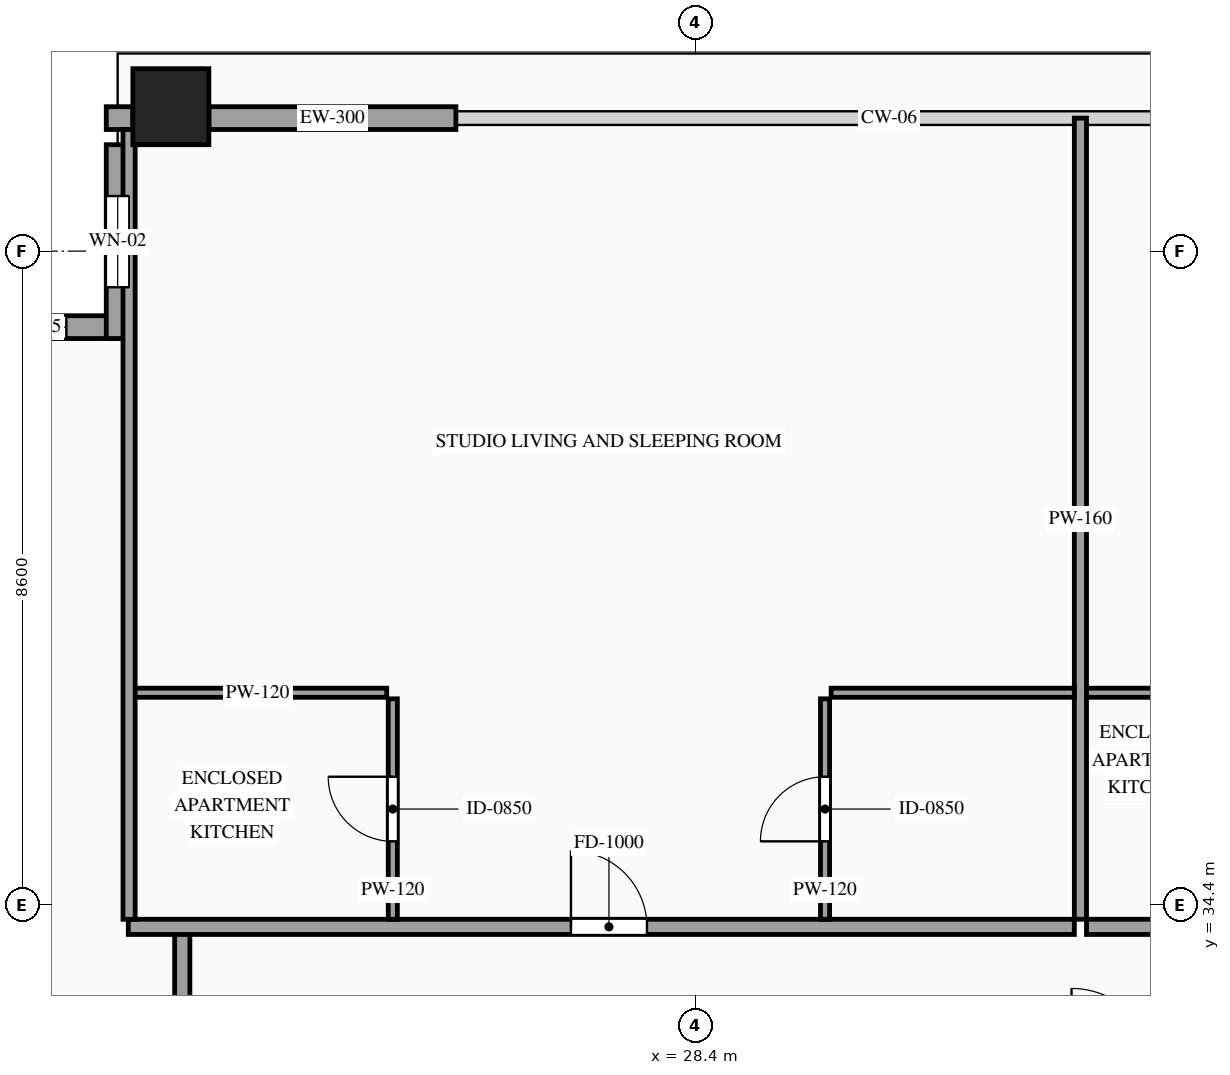
"""IFC4 building model, lengths in metres.
Left out: names, types, materials, properties, quantities, classifications, styles, units other than length and angle.
Written with IfcOpenShell. Run it as: python <this file> out.ifc"""

import sys

from ifc_helpers import new_model, si_unit, direction, frame, frame_2d, origin, origin_2d, place, context, subcontext, project, spatial, rectangle, hollow_rectangle, extrude, source, transform, mapped, element, fill, save


model = new_model("IFC4")
c1 = context("Model", 3, precision=1e-05, world=origin(), true_north=direction((0.0, 1.0)))
c2 = subcontext(c1, "Body", "Model", "MODEL_VIEW")
j1 = project(units=[si_unit("LENGTHUNIT", "METRE"), si_unit("PLANEANGLEUNIT", "RADIAN")], contexts=[c1])
p1 = place(None, origin())
s1 = spatial("IfcSite", under=j1, at=p1, CompositionType="ELEMENT")
p2 = place(p1, origin())
s2 = spatial("IfcBuilding", under=s1, at=p2, CompositionType="ELEMENT")
p3 = place(p2, frame((0.0, 0.0, 339.2)))
s3 = spatial("IfcBuildingStorey", under=s2, at=p3, CompositionType="ELEMENT", Elevation=339.2)
m1 = source(origin(), c2, "Body", "SweptSolid", [
    extrude(hollow_rectangle(XDim=1.0, YDim=1.0, WallThickness=0.048, at=origin_2d()), origin(), (0.0, 0.0, 1.0), 4.0),
])
p4 = place(p3, frame((21.5, 44.9, 0.0), z_axis=(0.0, 0.0, 1.0), x_axis=(1.0, 0.0, 0.0)))
e1 = element("IfcColumn", 1, at=p4, inside=s3, PredefinedType="COLUMN", context=c2, shape_type="MappedRepresentation", body=[
    mapped(m1, transform((0.0, 0.0, 0.0), scale=1.0)),
])
p5 = place(p3, frame((20.95, 42.0, 0.0), z_axis=(0.0, 0.0, 1.0), x_axis=(-1.0, 0.0, 0.0)))
e2 = element("IfcWall", 2, at=p5, inside=s3, PredefinedType="SOLIDWALL", context=c2, shape_type="SweptSolid", body=[
    extrude(rectangle(XDim=2.55, YDim=0.3, at=frame_2d((1.275, 0.0))), origin(), (0.0, 0.0, 1.0), 3.76),
])
p6 = place(p5, frame((0.825, 0.0, 0.85)))
e3 = element("IfcOpeningElement", 3, at=p6, cuts=e2, PredefinedType="OPENING", context=c2, shape_type="SweptSolid", body=[
    extrude(rectangle(XDim=0.9, YDim=1.5, at=frame_2d((0.45, 0.75))), frame((0.0, 0.165, 0.0), z_axis=(0.0, -1.0, 0.0), x_axis=(1.0, 0.0, 0.0)), (0.0, 0.0, 1.0), 0.33),
])
p7 = place(p3, frame((20.8, 44.4, 0.0), z_axis=(0.0, 0.0, 1.0), x_axis=(0.0, -1.0, 0.0)))
e4 = element("IfcWall", 4, at=p7, inside=s3, PredefinedType="SOLIDWALL", context=c2, shape_type="SweptSolid", body=[
    extrude(rectangle(XDim=2.55, YDim=0.3, at=frame_2d((1.275, 0.0))), origin(), (0.0, 0.0, 1.0), 3.76),
])
p8 = place(p7, frame((0.675, 0.0, 0.85)))
e5 = element("IfcOpeningElement", 5, at=p8, cuts=e4, PredefinedType="OPENING", context=c2, shape_type="SweptSolid", body=[
    extrude(rectangle(XDim=1.2, YDim=2.1, at=frame_2d((0.6, 1.05))), frame((0.0, 0.165, 0.0), z_axis=(0.0, -1.0, 0.0), x_axis=(1.0, 0.0, 0.0)), (0.0, 0.0, 1.0), 0.33),
])
m2 = source(origin(), c2, "Body", "SweptSolid", [
    extrude(rectangle(XDim=0.35, YDim=0.3, at=frame_2d((0.175, 0.0))), origin(), (0.0, 0.0, 1.0), 3.76),
])
p9 = place(p3, frame((20.65, 44.75, 0.0), z_axis=(0.0, 0.0, 1.0), x_axis=(1.0, 0.0, 0.0)))
e6 = element("IfcWall", 6, at=p9, inside=s3, PredefinedType="SOLIDWALL", context=c2, shape_type="MappedRepresentation", body=[
    mapped(m2, transform((0.0, 0.0, 0.0), scale=1.0)),
])
m3 = source(origin(), c2, "Body", "SweptSolid", [
    extrude(rectangle(XDim=3.25, YDim=0.3, at=frame_2d((1.625, 0.0))), origin(), (0.0, 0.0, 1.0), 3.365),
])
p10 = place(p3, frame((22.0, 44.75, 0.0), z_axis=(0.0, 0.0, 1.0), x_axis=(1.0, 0.0, 0.0)))
e7 = element("IfcWall", 7, at=p10, inside=s3, PredefinedType="SOLIDWALL", context=c2, shape_type="MappedRepresentation", body=[
    mapped(m3, transform((0.0, 0.0, 0.0), scale=1.0)),
])
m4 = source(origin(), c2, "Body", "SweptSolid", [
    extrude(rectangle(XDim=1.7, YDim=0.2, at=frame_2d((0.85, 0.0))), origin(), (0.0, 0.0, 1.0), 3.76),
])
p11 = place(p3, frame((21.65, 32.35, 0.0), z_axis=(0.0, 0.0, 1.0), x_axis=(0.0, 1.0, 0.0)))
e8 = element("IfcWall", 8, at=p11, inside=s3, PredefinedType="PARTITIONING", context=c2, shape_type="MappedRepresentation", body=[
    mapped(m4, transform((0.0, 0.0, 0.0), scale=1.0)),
])
p12 = place(p3, frame((20.94, 34.11, 0.0), z_axis=(0.0, 0.0, 1.0), x_axis=(1.0, 0.0, 0.0)))
e9 = element("IfcWall", 9, at=p12, inside=s3, PredefinedType="PARTITIONING", context=c2, shape_type="SweptSolid", body=[
    extrude(rectangle(XDim=12.447, YDim=0.2, at=frame_2d((6.224, 0.0))), origin(), (0.0, 0.0, 1.0), 3.76),
])
p13 = place(p12, frame((5.824, 0.0, 0.0)))
e10 = element("IfcOpeningElement", 10, at=p13, cuts=e9, PredefinedType="OPENING", context=c2, shape_type="SweptSolid", body=[
    extrude(rectangle(XDim=1.0, YDim=2.2, at=frame_2d((0.5, 1.1))), frame((0.0, 0.115, 0.0), z_axis=(0.0, -1.0, 0.0), x_axis=(1.0, 0.0, 0.0)), (0.0, 0.0, 1.0), 0.23),
])
m5 = source(origin(), c2, "Body", "SweptSolid", [
    extrude(rectangle(XDim=10.54, YDim=0.16, at=frame_2d((5.27, 0.0))), origin(), (0.0, 0.0, 1.0), 3.76),
])
p14 = place(p3, frame((33.467, 34.21, 0.0), z_axis=(0.0, 0.0, 1.0), x_axis=(0.0, 1.0, 0.0)))
e11 = element("IfcWall", 11, at=p14, inside=s3, PredefinedType="PARTITIONING", context=c2, shape_type="MappedRepresentation", body=[
    mapped(m5, transform((0.0, 0.0, 0.0), scale=1.0)),
])
m6 = source(origin(), c2, "Body", "SweptSolid", [
    extrude(rectangle(XDim=3.4, YDim=0.12, at=frame_2d((1.7, 0.0))), origin(), (0.0, 0.0, 1.0), 3.76),
])
p15 = place(p3, frame((20.94, 37.19, 0.0), z_axis=(0.0, 0.0, 1.0), x_axis=(1.0, 0.0, 0.0)))
e12 = element("IfcWall", 12, at=p15, inside=s3, PredefinedType="PARTITIONING", context=c2, shape_type="MappedRepresentation", body=[
    mapped(m6, transform((0.0, 0.0, 0.0), scale=1.0)),
])
p16 = place(p3, frame((24.42, 34.21, 0.0), z_axis=(0.0, 0.0, 1.0), x_axis=(0.0, 1.0, 0.0)))
e13 = element("IfcWall", 13, at=p16, inside=s3, PredefinedType="PARTITIONING", context=c2, shape_type="SweptSolid", body=[
    extrude(rectangle(XDim=2.9, YDim=0.12, at=frame_2d((1.45, 0.0))), origin(), (0.0, 0.0, 1.0), 3.76),
])
p17 = place(p16, frame((1.025, 0.0, 0.0)))
e14 = element("IfcOpeningElement", 14, at=p17, cuts=e13, PredefinedType="OPENING", context=c2, shape_type="SweptSolid", body=[
    extrude(rectangle(XDim=0.85, YDim=2.1, at=frame_2d((0.425, 1.05))), frame((0.0, 0.075, 0.0), z_axis=(0.0, -1.0, 0.0), x_axis=(1.0, 0.0, 0.0)), (0.0, 0.0, 1.0), 0.15),
])
m7 = source(origin(), c2, "Body", "SweptSolid", [
    extrude(rectangle(XDim=3.2, YDim=0.12, at=frame_2d((1.6, 0.0))), origin(), (0.0, 0.0, 1.0), 3.76),
])
p18 = place(p3, frame((30.187, 37.19, 0.0), z_axis=(0.0, 0.0, 1.0), x_axis=(1.0, 0.0, 0.0)))
e15 = element("IfcWall", 15, at=p18, inside=s3, PredefinedType="PARTITIONING", context=c2, shape_type="MappedRepresentation", body=[
    mapped(m7, transform((0.0, 0.0, 0.0), scale=1.0)),
])
p19 = place(p3, frame((30.107, 34.21, 0.0), z_axis=(0.0, 0.0, 1.0), x_axis=(0.0, 1.0, 0.0)))
e16 = element("IfcWall", 16, at=p19, inside=s3, PredefinedType="PARTITIONING", context=c2, shape_type="SweptSolid", body=[
    extrude(rectangle(XDim=2.9, YDim=0.12, at=frame_2d((1.45, 0.0))), origin(), (0.0, 0.0, 1.0), 3.76),
])
p20 = place(p19, frame((1.025, 0.0, 0.0)))
e17 = element("IfcOpeningElement", 17, at=p20, cuts=e16, PredefinedType="OPENING", context=c2, shape_type="SweptSolid", body=[
    extrude(rectangle(XDim=0.85, YDim=2.1, at=frame_2d((0.425, 1.05))), frame((0.0, 0.075, 0.0), z_axis=(0.0, -1.0, 0.0), x_axis=(1.0, 0.0, 0.0)), (0.0, 0.0, 1.0), 0.15),
])
p21 = place(p3, frame((33.547, 34.11, 0.0), z_axis=(0.0, 0.0, 1.0), x_axis=(1.0, 0.0, 0.0)))
e18 = element("IfcWall", 18, at=p21, inside=s3, PredefinedType="PARTITIONING", context=c2, shape_type="SweptSolid", body=[
    extrude(rectangle(XDim=6.906, YDim=0.2, at=frame_2d((3.453, 0.0))), origin(), (0.0, 0.0, 1.0), 3.76),
])
p22 = place(p21, frame((2.953, 0.0, 0.0)))
e19 = element("IfcOpeningElement", 19, at=p22, cuts=e18, PredefinedType="OPENING", context=c2, shape_type="SweptSolid", body=[
    extrude(rectangle(XDim=1.0, YDim=2.2, at=frame_2d((0.5, 1.1))), frame((0.0, 0.115, 0.0), z_axis=(0.0, -1.0, 0.0), x_axis=(1.0, 0.0, 0.0)), (0.0, 0.0, 1.0), 0.23),
])
m8 = source(origin(), c2, "Body", "SweptSolid", [
    extrude(rectangle(XDim=2.211, YDim=0.12, at=frame_2d((1.105, 0.0))), origin(), (0.0, 0.0, 1.0), 3.76),
])
p23 = place(p3, frame((33.547, 37.19, 0.0), z_axis=(0.0, 0.0, 1.0), x_axis=(1.0, 0.0, 0.0)))
e20 = element("IfcWall", 20, at=p23, inside=s3, PredefinedType="PARTITIONING", context=c2, shape_type="MappedRepresentation", body=[
    mapped(m8, transform((0.0, 0.0, 0.0), scale=1.0)),
])
m9 = source(origin(), c2, "Body", "SweptSolid", [
    extrude(rectangle(XDim=10.39, YDim=0.16, at=frame_2d((5.195, 0.0))), origin(), (0.0, 0.0, 1.0), 3.76),
])
p24 = place(p3, frame((20.95, 34.21, 0.0), z_axis=(0.0, 0.0, 1.0), x_axis=(0.0, 1.0, 0.0)))
e21 = element("IfcWall", 21, at=p24, inside=s3, PredefinedType="PARTITIONING", context=c2, shape_type="MappedRepresentation", body=[
    mapped(m9, transform((0.0, 0.0, 0.0), scale=1.0)),
])
m10 = source(origin(), c2, "Body", "SweptSolid", [
    extrude(rectangle(XDim=0.9, YDim=1.5, at=frame_2d((0.45, 0.75))), frame((0.0, 0.03, 0.0), z_axis=(0.0, -1.0, 0.0), x_axis=(1.0, 0.0, 0.0)), (0.0, 0.0, 1.0), 0.06),
])
p25 = place(p6, origin())
e22 = element("IfcWindow", 22, at=p25, inside=s3, PartitioningType="SINGLE_PANEL", PredefinedType="WINDOW", context=c2, shape_type="MappedRepresentation", body=[
    mapped(m10, transform((0.0, 0.0, 0.0), scale=1.0)),
])
fill(e3, e22)
m11 = source(origin(), c2, "Body", "SweptSolid", [
    extrude(rectangle(XDim=1.2, YDim=2.1, at=frame_2d((0.6, 1.05))), frame((0.0, 0.03, 0.0), z_axis=(0.0, -1.0, 0.0), x_axis=(1.0, 0.0, 0.0)), (0.0, 0.0, 1.0), 0.06),
])
p26 = place(p8, origin())
e23 = element("IfcWindow", 23, at=p26, inside=s3, PartitioningType="SINGLE_PANEL", PredefinedType="WINDOW", context=c2, shape_type="MappedRepresentation", body=[
    mapped(m11, transform((0.0, 0.0, 0.0), scale=1.0)),
])
fill(e5, e23)
m12 = source(origin(), c2, "Body", "SweptSolid", [
    extrude(rectangle(XDim=1.0, YDim=2.2, at=frame_2d((0.5, 1.1))), frame((0.0, 0.025, 0.0), z_axis=(0.0, -1.0, 0.0), x_axis=(1.0, 0.0, 0.0)), (0.0, 0.0, 1.0), 0.05),
])
p27 = place(p13, origin())
e24 = element("IfcDoor", 24, at=p27, inside=s3, OperationType="SINGLE_SWING_LEFT", PredefinedType="DOOR", context=c2, shape_type="MappedRepresentation", body=[
    mapped(m12, transform((0.0, 0.0, 0.0), scale=1.0)),
])
fill(e10, e24)
m13 = source(origin(), c2, "Body", "SweptSolid", [
    extrude(rectangle(XDim=0.85, YDim=2.1, at=frame_2d((0.425, 1.05))), frame((0.0, 0.025, 0.0), z_axis=(0.0, -1.0, 0.0), x_axis=(1.0, 0.0, 0.0)), (0.0, 0.0, 1.0), 0.05),
])
p28 = place(p17, origin())
e25 = element("IfcDoor", 25, at=p28, inside=s3, OperationType="SINGLE_SWING_RIGHT", PredefinedType="DOOR", context=c2, shape_type="MappedRepresentation", body=[
    mapped(m13, transform((0.0, 0.0, 0.0), scale=1.0)),
])
fill(e14, e25)
p29 = place(p20, origin())
e26 = element("IfcDoor", 26, at=p29, inside=s3, OperationType="SINGLE_SWING_LEFT", PredefinedType="DOOR", context=c2, shape_type="MappedRepresentation", body=[
    mapped(m13, transform((0.0, 0.0, 0.0), scale=1.0)),
])
fill(e17, e26)
save(model, sys.argv[1])
